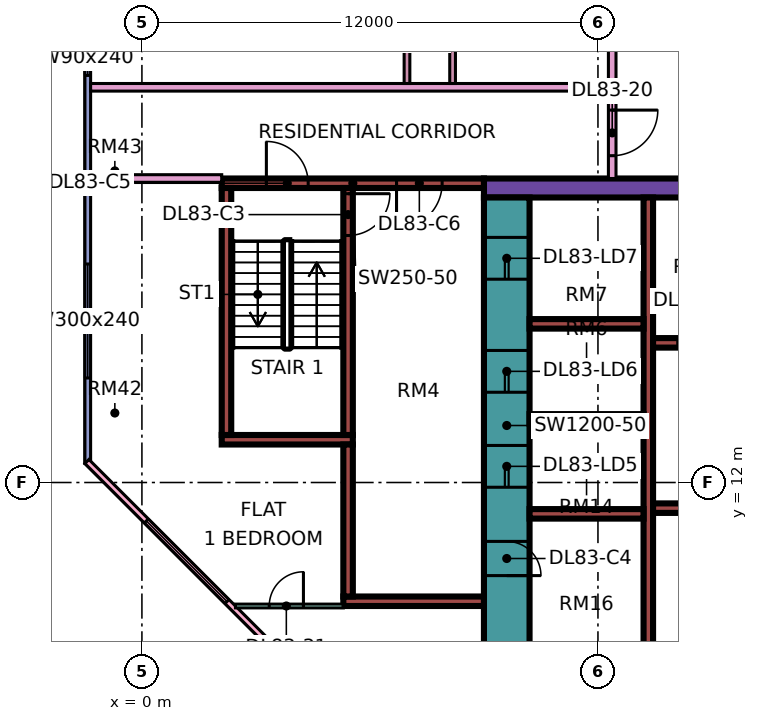
"""IFC4 building model, lengths in metres.
Left out: names, types, materials, properties, quantities, classifications, styles, units other than length and angle.
Written with IfcOpenShell. Run it as: python <this file> out.ifc"""

import sys

from ifc_helpers import new_model, si_unit, direction, frame, frame_2d, origin, place, context, subcontext, project, spatial, rectangle, extrude, element, fill, save


model = new_model("IFC4")
c1 = context("Model", 3, precision=1e-05, world=origin(), true_north=direction((0.0, 1.0)))
c2 = subcontext(c1, "Body", "Model", "MODEL_VIEW")
j1 = project(units=[si_unit("LENGTHUNIT", "METRE"), si_unit("PLANEANGLEUNIT", "RADIAN")], contexts=[c1])
p1 = place(None, origin())
s1 = spatial("IfcSite", under=j1, at=p1, CompositionType="ELEMENT")
p2 = place(p1, origin())
s2 = spatial("IfcBuilding", under=s1, at=p2, CompositionType="ELEMENT")
p3 = place(p2, frame((0.0, 0.0, 357.65)))
s3 = spatial("IfcBuildingStorey", under=s2, at=p3, CompositionType="ELEMENT", Elevation=357.65)
p4 = place(p3, frame((9.0, 19.75, 0.0), z_axis=(0.0, 0.0, 1.0), x_axis=(1.0, 0.0, 0.0)))
e1 = element("IfcWall", 1, at=p4, inside=s3, PredefinedType="SHEAR", context=c2, shape_type="SweptSolid", body=[
    extrude(rectangle(XDim=25.0, YDim=0.5, at=frame_2d((12.5, 0.0))), origin(), (0.0, 0.0, 1.0), 3.75),
])
p5 = place(p4, frame((19.1, 0.0, 0.0)))
e2 = element("IfcOpeningElement", 2, at=p5, cuts=e1, PredefinedType="OPENING", context=c2, shape_type="SweptSolid", body=[
    extrude(rectangle(XDim=1.8, YDim=2.4, at=frame_2d((0.9, 1.2))), frame((0.0, 0.26, 0.0), z_axis=(0.0, -1.0, 0.0), x_axis=(1.0, 0.0, 0.0)), (0.0, 0.0, 1.0), 0.52),
])
p6 = place(p3, frame((9.6, 7.5, 0.0), z_axis=(0.0, 0.0, 1.0), x_axis=(0.0, 1.0, 0.0)))
e3 = element("IfcWall", 3, at=p6, inside=s3, PredefinedType="SHEAR", context=c2, shape_type="SweptSolid", body=[
    extrude(rectangle(XDim=12.0, YDim=1.2, at=frame_2d((6.0, 0.0))), origin(), (0.0, 0.0, 1.0), 3.75),
])
p7 = place(p6, frame((4.375, 0.0, 0.0)))
e4 = element("IfcOpeningElement", 4, at=p7, cuts=e3, PredefinedType="OPENING", context=c2, shape_type="SweptSolid", body=[
    extrude(rectangle(XDim=1.1, YDim=2.2, at=frame_2d((0.55, 1.1))), frame((0.0, 0.61, 0.0), z_axis=(0.0, -1.0, 0.0), x_axis=(1.0, 0.0, 0.0)), (0.0, 0.0, 1.0), 1.22),
])
p8 = place(p6, frame((6.875, 0.0, 0.0)))
e5 = element("IfcOpeningElement", 5, at=p8, cuts=e3, PredefinedType="OPENING", context=c2, shape_type="SweptSolid", body=[
    extrude(rectangle(XDim=1.1, YDim=2.2, at=frame_2d((0.55, 1.1))), frame((0.0, 0.61, 0.0), z_axis=(0.0, -1.0, 0.0), x_axis=(1.0, 0.0, 0.0)), (0.0, 0.0, 1.0), 1.22),
])
p9 = place(p6, frame((9.85, 0.0, 0.0)))
e6 = element("IfcOpeningElement", 6, at=p9, cuts=e3, PredefinedType="OPENING", context=c2, shape_type="SweptSolid", body=[
    extrude(rectangle(XDim=1.1, YDim=2.2, at=frame_2d((0.55, 1.1))), frame((0.0, 0.61, 0.0), z_axis=(0.0, -1.0, 0.0), x_axis=(1.0, 0.0, 0.0)), (0.0, 0.0, 1.0), 1.22),
])
p10 = place(p6, frame((2.05, 0.0, 0.0)))
e7 = element("IfcOpeningElement", 7, at=p10, cuts=e3, PredefinedType="OPENING", context=c2, shape_type="SweptSolid", body=[
    extrude(rectangle(XDim=0.9, YDim=2.1, at=frame_2d((0.45, 1.05))), frame((0.0, 0.61, 0.0), z_axis=(0.0, -1.0, 0.0), x_axis=(1.0, 0.0, 0.0)), (0.0, 0.0, 1.0), 1.22),
])
p11 = place(p3, frame((13.325, 7.5, 0.0), z_axis=(0.0, 0.0, 1.0), x_axis=(0.0, 1.0, 0.0)))
e8 = element("IfcWall", 8, at=p11, inside=s3, PredefinedType="SHEAR", context=c2, shape_type="SweptSolid", body=[
    extrude(rectangle(XDim=12.0, YDim=0.25, at=frame_2d((6.0, 0.0))), origin(), (0.0, 0.0, 1.0), 3.75),
])
p12 = place(p3, frame((13.45, 11.325, 0.0), z_axis=(0.0, 0.0, 1.0), x_axis=(1.0, 0.0, 0.0)))
e9 = element("IfcWall", 9, at=p12, inside=s3, PredefinedType="SHEAR", context=c2, shape_type="SweptSolid", body=[
    extrude(rectangle(XDim=20.05, YDim=0.25, at=frame_2d((10.025, 0.0))), origin(), (0.0, 0.0, 1.0), 3.75),
])
p13 = place(p12, frame((2.8, 0.0, 0.0)))
e10 = element("IfcOpeningElement", 10, at=p13, cuts=e9, PredefinedType="OPENING", context=c2, shape_type="SweptSolid", body=[
    extrude(rectangle(XDim=0.9, YDim=2.1, at=frame_2d((0.45, 1.05))), frame((0.0, 0.135, 0.0), z_axis=(0.0, -1.0, 0.0), x_axis=(1.0, 0.0, 0.0)), (0.0, 0.0, 1.0), 0.27),
])
p14 = place(p12, frame((8.175, 0.0, 0.0)))
e11 = element("IfcOpeningElement", 11, at=p14, cuts=e9, PredefinedType="OPENING", context=c2, shape_type="SweptSolid", body=[
    extrude(rectangle(XDim=0.9, YDim=2.1, at=frame_2d((0.45, 1.05))), frame((0.0, 0.135, 0.0), z_axis=(0.0, -1.0, 0.0), x_axis=(1.0, 0.0, 0.0)), (0.0, 0.0, 1.0), 0.27),
])
p15 = place(p12, frame((13.175, 0.0, 0.0)))
e12 = element("IfcOpeningElement", 12, at=p15, cuts=e9, PredefinedType="OPENING", context=c2, shape_type="SweptSolid", body=[
    extrude(rectangle(XDim=0.9, YDim=2.1, at=frame_2d((0.45, 1.05))), frame((0.0, 0.135, 0.0), z_axis=(0.0, -1.0, 0.0), x_axis=(1.0, 0.0, 0.0)), (0.0, 0.0, 1.0), 0.27),
])
p16 = place(p12, frame((17.7, 0.0, 0.0)))
e13 = element("IfcOpeningElement", 13, at=p16, cuts=e9, PredefinedType="OPENING", context=c2, shape_type="SweptSolid", body=[
    extrude(rectangle(XDim=0.9, YDim=2.1, at=frame_2d((0.45, 1.05))), frame((0.0, 0.135, 0.0), z_axis=(0.0, -1.0, 0.0), x_axis=(1.0, 0.0, 0.0)), (0.0, 0.0, 1.0), 0.27),
])
p17 = place(p3, frame((13.45, 15.675, 0.0), z_axis=(0.0, 0.0, 1.0), x_axis=(1.0, 0.0, 0.0)))
e14 = element("IfcWall", 14, at=p17, inside=s3, PredefinedType="SHEAR", context=c2, shape_type="SweptSolid", body=[
    extrude(rectangle(XDim=13.75, YDim=0.25, at=frame_2d((6.875, 0.0))), origin(), (0.0, 0.0, 1.0), 3.75),
])
p18 = place(p17, frame((0.65, 0.0, 0.0)))
e15 = element("IfcOpeningElement", 15, at=p18, cuts=e14, PredefinedType="OPENING", context=c2, shape_type="SweptSolid", body=[
    extrude(rectangle(XDim=1.2, YDim=2.2, at=frame_2d((0.6, 1.1))), frame((0.0, 0.135, 0.0), z_axis=(0.0, -1.0, 0.0), x_axis=(1.0, 0.0, 0.0)), (0.0, 0.0, 1.0), 0.27),
])
p19 = place(p17, frame((3.4, 0.0, 0.0)))
e16 = element("IfcOpeningElement", 16, at=p19, cuts=e14, PredefinedType="OPENING", context=c2, shape_type="SweptSolid", body=[
    extrude(rectangle(XDim=1.2, YDim=2.2, at=frame_2d((0.6, 1.1))), frame((0.0, 0.135, 0.0), z_axis=(0.0, -1.0, 0.0), x_axis=(1.0, 0.0, 0.0)), (0.0, 0.0, 1.0), 0.27),
])
p20 = place(p17, frame((6.15, 0.0, 0.0)))
e17 = element("IfcOpeningElement", 17, at=p20, cuts=e14, PredefinedType="OPENING", context=c2, shape_type="SweptSolid", body=[
    extrude(rectangle(XDim=1.2, YDim=2.2, at=frame_2d((0.6, 1.1))), frame((0.0, 0.135, 0.0), z_axis=(0.0, -1.0, 0.0), x_axis=(1.0, 0.0, 0.0)), (0.0, 0.0, 1.0), 0.27),
])
p21 = place(p17, frame((8.9, 0.0, 0.0)))
e18 = element("IfcOpeningElement", 18, at=p21, cuts=e14, PredefinedType="OPENING", context=c2, shape_type="SweptSolid", body=[
    extrude(rectangle(XDim=1.2, YDim=2.2, at=frame_2d((0.6, 1.1))), frame((0.0, 0.135, 0.0), z_axis=(0.0, -1.0, 0.0), x_axis=(1.0, 0.0, 0.0)), (0.0, 0.0, 1.0), 0.27),
])
p22 = place(p17, frame((11.8, 0.0, 0.0)))
e19 = element("IfcOpeningElement", 19, at=p22, cuts=e14, PredefinedType="OPENING", context=c2, shape_type="SweptSolid", body=[
    extrude(rectangle(XDim=0.9, YDim=2.1, at=frame_2d((0.45, 1.05))), frame((0.0, 0.135, 0.0), z_axis=(0.0, -1.0, 0.0), x_axis=(1.0, 0.0, 0.0)), (0.0, 0.0, 1.0), 0.27),
])
for number, where, z_axis, x_axis in (
    (20, (10.2, 11.175, 0.0), (0.0, 0.0, 1.0), (1.0, 0.0, 0.0)),
    (21, (10.2, 13.675, 0.0), (0.0, 0.0, 1.0), (1.0, 0.0, 0.0)),
    (22, (10.2, 16.175, 0.0), (0.0, 0.0, 1.0), (1.0, 0.0, 0.0)),
):
    element("IfcWall", number, at=place(p3, frame(where, z_axis=z_axis, x_axis=x_axis)), inside=s3, PredefinedType="SHEAR", context=c2, shape_type="SweptSolid", body=[
        extrude(rectangle(XDim=3.0, YDim=0.25, at=frame_2d((1.5, 0.0))), origin(), (0.0, 0.0, 1.0), 3.75),
    ])
p23 = place(p3, frame((2.1, 19.875, 0.0), z_axis=(0.0, 0.0, 1.0), x_axis=(1.0, 0.0, 0.0)))
e23 = element("IfcWall", 23, at=p23, inside=s3, PredefinedType="SHEAR", context=c2, shape_type="SweptSolid", body=[
    extrude(rectangle(XDim=6.9, YDim=0.25, at=frame_2d((3.45, 0.0))), origin(), (0.0, 0.0, 1.0), 3.75),
])
p24 = place(p23, frame((1.175, 0.0, 0.0)))
e24 = element("IfcOpeningElement", 24, at=p24, cuts=e23, PredefinedType="OPENING", context=c2, shape_type="SweptSolid", body=[
    extrude(rectangle(XDim=1.1, YDim=2.2, at=frame_2d((0.55, 1.1))), frame((0.0, 0.135, 0.0), z_axis=(0.0, -1.0, 0.0), x_axis=(1.0, 0.0, 0.0)), (0.0, 0.0, 1.0), 0.27),
])
p25 = place(p23, frame((4.6, 0.0, 0.0)))
e25 = element("IfcOpeningElement", 25, at=p25, cuts=e23, PredefinedType="OPENING", context=c2, shape_type="SweptSolid", body=[
    extrude(rectangle(XDim=1.2, YDim=2.2, at=frame_2d((0.6, 1.1))), frame((0.0, 0.135, 0.0), z_axis=(0.0, -1.0, 0.0), x_axis=(1.0, 0.0, 0.0)), (0.0, 0.0, 1.0), 0.27),
])
p26 = place(p3, frame((2.1, 13.125, 0.0), z_axis=(0.0, 0.0, 1.0), x_axis=(1.0, 0.0, 0.0)))
e26 = element("IfcWall", 26, at=p26, inside=s3, PredefinedType="SHEAR", context=c2, shape_type="SweptSolid", body=[
    extrude(rectangle(XDim=3.45, YDim=0.25, at=frame_2d((1.725, 0.0))), origin(), (0.0, 0.0, 1.0), 3.75),
])
p27 = place(p3, frame((2.225, 13.25, 0.0), z_axis=(0.0, 0.0, 1.0), x_axis=(0.0, 1.0, 0.0)))
e27 = element("IfcWall", 27, at=p27, inside=s3, PredefinedType="SHEAR", context=c2, shape_type="SweptSolid", body=[
    extrude(rectangle(XDim=6.5, YDim=0.25, at=frame_2d((3.25, 0.0))), origin(), (0.0, 0.0, 1.0), 3.75),
])
p28 = place(p3, frame((5.425, 13.25, 0.0), z_axis=(0.0, 0.0, 1.0), x_axis=(0.0, 1.0, 0.0)))
e28 = element("IfcWall", 28, at=p28, inside=s3, PredefinedType="SHEAR", context=c2, shape_type="SweptSolid", body=[
    extrude(rectangle(XDim=6.5, YDim=0.25, at=frame_2d((3.25, 0.0))), origin(), (0.0, 0.0, 1.0), 3.75),
])
p29 = place(p28, frame((5.25, 0.0, 0.0)))
e29 = element("IfcOpeningElement", 29, at=p29, cuts=e28, PredefinedType="OPENING", context=c2, shape_type="SweptSolid", body=[
    extrude(rectangle(XDim=1.1, YDim=2.2, at=frame_2d((0.55, 1.1))), frame((0.0, 0.135, 0.0), z_axis=(0.0, -1.0, 0.0), x_axis=(1.0, 0.0, 0.0)), (0.0, 0.0, 1.0), 0.27),
])
p30 = place(p3, frame((5.3, 8.875, 0.0), z_axis=(0.0, 0.0, 1.0), x_axis=(1.0, 0.0, 0.0)))
e30 = element("IfcWall", 30, at=p30, inside=s3, PredefinedType="SHEAR", context=c2, shape_type="SweptSolid", body=[
    extrude(rectangle(XDim=3.7, YDim=0.25, at=frame_2d((1.85, 0.0))), origin(), (0.0, 0.0, 1.0), 3.75),
])
p31 = place(p3, frame((5.425, 9.0, 0.0), z_axis=(0.0, 0.0, 1.0), x_axis=(0.0, 1.0, 0.0)))
e31 = element("IfcWall", 31, at=p31, inside=s3, PredefinedType="SHEAR", context=c2, shape_type="SweptSolid", body=[
    extrude(rectangle(XDim=4.0, YDim=0.25, at=frame_2d((2.0, 0.0))), origin(), (0.0, 0.0, 1.0), 3.75),
])
p32 = place(p3, frame((-1.425, 23.925, 0.0), z_axis=(0.0, 0.0, 1.0), x_axis=(0.0, -1.0, 0.0)))
e32 = element("IfcWall", 32, at=p32, inside=s3, PredefinedType="SOLIDWALL", context=c2, shape_type="SweptSolid", body=[
    extrude(rectangle(XDim=11.425, YDim=0.15, at=frame_2d((5.712, 0.0))), origin(), (0.0, 0.0, 1.0), 3.35),
])
p33 = place(p32, frame((0.312, 0.0, 0.45)))
e33 = element("IfcOpeningElement", 33, at=p33, cuts=e32, PredefinedType="OPENING", context=c2, shape_type="SweptSolid", body=[
    extrude(rectangle(XDim=0.9, YDim=2.4, at=frame_2d((0.45, 1.2))), frame((0.0, 0.085, 0.0), z_axis=(0.0, -1.0, 0.0), x_axis=(1.0, 0.0, 0.0)), (0.0, 0.0, 1.0), 0.17),
])
p34 = place(p32, frame((6.175, 0.0, 0.45)))
e34 = element("IfcOpeningElement", 34, at=p34, cuts=e32, PredefinedType="OPENING", context=c2, shape_type="SweptSolid", body=[
    extrude(rectangle(XDim=3.0, YDim=2.4, at=frame_2d((1.5, 1.2))), frame((0.0, 0.085, 0.0), z_axis=(0.0, -1.0, 0.0), x_axis=(1.0, 0.0, 0.0)), (0.0, 0.0, 1.0), 0.17),
])
p35 = place(p3, frame((-1.447, 12.553, 0.0), z_axis=(0.0, 0.0, 1.0), x_axis=(0.707106781187, -0.707106781187, 0.0)))
e35 = element("IfcWall", 35, at=p35, inside=s3, PredefinedType="SOLIDWALL", context=c2, shape_type="SweptSolid", body=[
    extrude(rectangle(XDim=19.799, YDim=0.15, at=frame_2d((9.899, 0.0))), origin(), (0.0, 0.0, 1.0), 3.35),
])
p36 = place(p35, frame((2.212, 0.0, 0.45)))
e36 = element("IfcOpeningElement", 36, at=p36, cuts=e35, PredefinedType="OPENING", context=c2, shape_type="SweptSolid", body=[
    extrude(rectangle(XDim=3.0, YDim=2.4, at=frame_2d((1.5, 1.2))), frame((0.0, 0.085, 0.0), z_axis=(0.0, -1.0, 0.0), x_axis=(1.0, 0.0, 0.0)), (0.0, 0.0, 1.0), 0.17),
])
p37 = place(p35, frame((10.216, 0.0, 0.45)))
e37 = element("IfcOpeningElement", 37, at=p37, cuts=e35, PredefinedType="OPENING", context=c2, shape_type="SweptSolid", body=[
    extrude(rectangle(XDim=3.0, YDim=2.4, at=frame_2d((1.5, 1.2))), frame((0.0, 0.085, 0.0), z_axis=(0.0, -1.0, 0.0), x_axis=(1.0, 0.0, 0.0)), (0.0, 0.0, 1.0), 0.17),
])
p38 = place(p3, frame((-1.35, 20.0, 0.0), z_axis=(0.0, 0.0, 1.0), x_axis=(1.0, 0.0, 0.0)))
e38 = element("IfcWall", 38, at=p38, inside=s3, PredefinedType="PARTITIONING", context=c2, shape_type="SweptSolid", body=[
    extrude(rectangle(XDim=3.45, YDim=0.2, at=frame_2d((1.725, 0.0))), origin(), (0.0, 0.0, 1.0), 3.35),
])
p39 = place(p3, frame((-1.35, 22.4, 0.0), z_axis=(0.0, 0.0, 1.0), x_axis=(1.0, 0.0, 0.0)))
e39 = element("IfcWall", 39, at=p39, inside=s3, PredefinedType="PARTITIONING", context=c2, shape_type="SweptSolid", body=[
    extrude(rectangle(XDim=13.625, YDim=0.2, at=frame_2d((6.812, 0.0))), origin(), (0.0, 0.0, 1.0), 3.35),
])
p40 = place(p3, frame((2.461, 8.75, 0.0), z_axis=(0.0, 0.0, 1.0), x_axis=(1.0, 0.0, 0.0)))
e40 = element("IfcWall", 40, at=p40, inside=s3, PredefinedType="PARTITIONING", context=c2, shape_type="SweptSolid", body=[
    extrude(rectangle(XDim=2.839, YDim=0.1, at=frame_2d((1.419, 0.0))), origin(), (0.0, 0.0, 1.0), 3.35),
])
p41 = place(p40, frame((0.889, 0.0, 0.0)))
e41 = element("IfcOpeningElement", 41, at=p41, cuts=e40, PredefinedType="OPENING", context=c2, shape_type="SweptSolid", body=[
    extrude(rectangle(XDim=0.9, YDim=2.1, at=frame_2d((0.45, 1.05))), frame((0.0, 0.06, 0.0), z_axis=(0.0, -1.0, 0.0), x_axis=(1.0, 0.0, 0.0)), (0.0, 0.0, 1.0), 0.12),
])
p42 = place(p3, frame((6.975, 22.5, 0.0), z_axis=(0.0, 0.0, 1.0), x_axis=(0.0, 1.0, 0.0)))
e42 = element("IfcWall", 42, at=p42, inside=s3, PredefinedType="PARTITIONING", context=c2, shape_type="SweptSolid", body=[
    extrude(rectangle(XDim=10.55, YDim=0.15, at=frame_2d((5.275, 0.0))), origin(), (0.0, 0.0, 1.0), 3.35),
])
p43 = place(p42, frame((1.8, 0.0, 0.0)))
e43 = element("IfcOpeningElement", 43, at=p43, cuts=e42, PredefinedType="OPENING", context=c2, shape_type="SweptSolid", body=[
    extrude(rectangle(XDim=0.9, YDim=2.1, at=frame_2d((0.45, 1.05))), frame((0.0, 0.085, 0.0), z_axis=(0.0, -1.0, 0.0), x_axis=(1.0, 0.0, 0.0)), (0.0, 0.0, 1.0), 0.17),
])
p44 = place(p42, frame((8.55, 0.0, 0.0)))
e44 = element("IfcOpeningElement", 44, at=p44, cuts=e42, PredefinedType="OPENING", context=c2, shape_type="SweptSolid", body=[
    extrude(rectangle(XDim=0.9, YDim=2.1, at=frame_2d((0.45, 1.05))), frame((0.0, 0.085, 0.0), z_axis=(0.0, -1.0, 0.0), x_axis=(1.0, 0.0, 0.0)), (0.0, 0.0, 1.0), 0.17),
])
p45 = place(p3, frame((8.175, 22.5, 0.0), z_axis=(0.0, 0.0, 1.0), x_axis=(0.0, 1.0, 0.0)))
e45 = element("IfcWall", 45, at=p45, inside=s3, PredefinedType="PARTITIONING", context=c2, shape_type="SweptSolid", body=[
    extrude(rectangle(XDim=9.975, YDim=0.15, at=frame_2d((4.988, 0.0))), origin(), (0.0, 0.0, 1.0), 3.35),
])
p46 = place(p45, frame((8.25, 0.0, 0.0)))
e46 = element("IfcOpeningElement", 46, at=p46, cuts=e45, PredefinedType="OPENING", context=c2, shape_type="SweptSolid", body=[
    extrude(rectangle(XDim=0.8, YDim=2.1, at=frame_2d((0.4, 1.05))), frame((0.0, 0.085, 0.0), z_axis=(0.0, -1.0, 0.0), x_axis=(1.0, 0.0, 0.0)), (0.0, 0.0, 1.0), 0.17),
])
p47 = place(p45, frame((3.2, 0.0, 0.0)))
e47 = element("IfcOpeningElement", 47, at=p47, cuts=e45, PredefinedType="OPENING", context=c2, shape_type="SweptSolid", body=[
    extrude(rectangle(XDim=0.9, YDim=2.1, at=frame_2d((0.45, 1.05))), frame((0.0, 0.085, 0.0), z_axis=(0.0, -1.0, 0.0), x_axis=(1.0, 0.0, 0.0)), (0.0, 0.0, 1.0), 0.17),
])
p48 = place(p3, frame((12.375, 20.0, 0.0), z_axis=(0.0, 0.0, 1.0), x_axis=(0.0, 1.0, 0.0)))
e48 = element("IfcWall", 48, at=p48, inside=s3, PredefinedType="PARTITIONING", context=c2, shape_type="SweptSolid", body=[
    extrude(rectangle(XDim=34.0, YDim=0.2, at=frame_2d((17.0, 0.0))), origin(), (0.0, 0.0, 1.0), 3.35),
])
p49 = place(p48, frame((22.95, 0.0, 0.0)))
e49 = element("IfcOpeningElement", 49, at=p49, cuts=e48, PredefinedType="OPENING", context=c2, shape_type="SweptSolid", body=[
    extrude(rectangle(XDim=1.0, YDim=2.1, at=frame_2d((0.5, 1.05))), frame((0.0, 0.11, 0.0), z_axis=(0.0, -1.0, 0.0), x_axis=(1.0, 0.0, 0.0)), (0.0, 0.0, 1.0), 0.22),
])
p50 = place(p48, frame((0.6, 0.0, 0.0)))
e50 = element("IfcOpeningElement", 50, at=p50, cuts=e48, PredefinedType="OPENING", context=c2, shape_type="SweptSolid", body=[
    extrude(rectangle(XDim=1.2, YDim=2.1, at=frame_2d((0.6, 1.05))), frame((0.0, 0.11, 0.0), z_axis=(0.0, -1.0, 0.0), x_axis=(1.0, 0.0, 0.0)), (0.0, 0.0, 1.0), 0.22),
])
p51 = place(p48, frame((13.65, 0.0, 0.0)))
e51 = element("IfcOpeningElement", 51, at=p51, cuts=e48, PredefinedType="OPENING", context=c2, shape_type="SweptSolid", body=[
    extrude(rectangle(XDim=1.0, YDim=2.1, at=frame_2d((0.5, 1.05))), frame((0.0, 0.11, 0.0), z_axis=(0.0, -1.0, 0.0), x_axis=(1.0, 0.0, 0.0)), (0.0, 0.0, 1.0), 0.22),
])
p52 = place(p33, origin())
e52 = element("IfcWindow", 52, at=p52, inside=s3, PartitioningType="SINGLE_PANEL", PredefinedType="WINDOW", context=c2, shape_type="SweptSolid", body=[
    extrude(rectangle(XDim=0.9, YDim=2.4, at=frame_2d((0.45, 1.2))), frame((0.0, 0.03, 0.0), z_axis=(0.0, -1.0, 0.0), x_axis=(1.0, 0.0, 0.0)), (0.0, 0.0, 1.0), 0.06),
])
fill(e33, e52)
p53 = place(p34, origin())
e53 = element("IfcWindow", 53, at=p53, inside=s3, PartitioningType="SINGLE_PANEL", PredefinedType="WINDOW", context=c2, shape_type="SweptSolid", body=[
    extrude(rectangle(XDim=3.0, YDim=2.4, at=frame_2d((1.5, 1.2))), frame((0.0, 0.03, 0.0), z_axis=(0.0, -1.0, 0.0), x_axis=(1.0, 0.0, 0.0)), (0.0, 0.0, 1.0), 0.06),
])
fill(e34, e53)
p54 = place(p36, origin())
e54 = element("IfcWindow", 54, at=p54, inside=s3, PartitioningType="SINGLE_PANEL", PredefinedType="WINDOW", context=c2, shape_type="SweptSolid", body=[
    extrude(rectangle(XDim=3.0, YDim=2.4, at=frame_2d((1.5, 1.2))), frame((0.0, 0.03, 0.0), z_axis=(0.0, -1.0, 0.0), x_axis=(1.0, 0.0, 0.0)), (0.0, 0.0, 1.0), 0.06),
])
fill(e36, e54)
p55 = place(p18, origin())
e55 = element("IfcDoor", 55, at=p55, inside=s3, OperationType="DOUBLE_DOOR_SLIDING", PredefinedType="DOOR", context=c2, shape_type="SweptSolid", body=[
    extrude(rectangle(XDim=1.2, YDim=2.2, at=frame_2d((0.6, 1.1))), frame((0.0, 0.025, 0.0), z_axis=(0.0, -1.0, 0.0), x_axis=(1.0, 0.0, 0.0)), (0.0, 0.0, 1.0), 0.05),
])
fill(e15, e55)
p56 = place(p7, origin())
e56 = element("IfcDoor", 56, at=p56, inside=s3, OperationType="DOUBLE_DOOR_SLIDING", PredefinedType="DOOR", context=c2, shape_type="SweptSolid", body=[
    extrude(rectangle(XDim=1.1, YDim=2.2, at=frame_2d((0.55, 1.1))), frame((0.0, 0.025, 0.0), z_axis=(0.0, -1.0, 0.0), x_axis=(1.0, 0.0, 0.0)), (0.0, 0.0, 1.0), 0.05),
])
fill(e4, e56)
p57 = place(p8, origin())
e57 = element("IfcDoor", 57, at=p57, inside=s3, OperationType="DOUBLE_DOOR_SLIDING", PredefinedType="DOOR", context=c2, shape_type="SweptSolid", body=[
    extrude(rectangle(XDim=1.1, YDim=2.2, at=frame_2d((0.55, 1.1))), frame((0.0, 0.025, 0.0), z_axis=(0.0, -1.0, 0.0), x_axis=(1.0, 0.0, 0.0)), (0.0, 0.0, 1.0), 0.05),
])
fill(e5, e57)
p58 = place(p9, origin())
e58 = element("IfcDoor", 58, at=p58, inside=s3, OperationType="DOUBLE_DOOR_SLIDING", PredefinedType="DOOR", context=c2, shape_type="SweptSolid", body=[
    extrude(rectangle(XDim=1.1, YDim=2.2, at=frame_2d((0.55, 1.1))), frame((0.0, 0.025, 0.0), z_axis=(0.0, -1.0, 0.0), x_axis=(1.0, 0.0, 0.0)), (0.0, 0.0, 1.0), 0.05),
])
fill(e6, e58)
p59 = place(p29, origin())
e59 = element("IfcDoor", 59, at=p59, inside=s3, OperationType="SINGLE_SWING_RIGHT", PredefinedType="DOOR", context=c2, shape_type="SweptSolid", body=[
    extrude(rectangle(XDim=1.1, YDim=2.2, at=frame_2d((0.55, 1.1))), frame((0.0, 0.025, 0.0), z_axis=(0.0, -1.0, 0.0), x_axis=(1.0, 0.0, 0.0)), (0.0, 0.0, 1.0), 0.05),
])
fill(e29, e59)
p60 = place(p10, frame((0.9, 0.0, 0.0), z_axis=(0.0, 0.0, 1.0), x_axis=(-1.0, 0.0, 0.0)))
e60 = element("IfcDoor", 60, at=p60, inside=s3, OperationType="SINGLE_SWING_LEFT", PredefinedType="DOOR", context=c2, shape_type="SweptSolid", body=[
    extrude(rectangle(XDim=0.9, YDim=2.1, at=frame_2d((0.45, 1.05))), frame((0.0, 0.025, 0.0), z_axis=(0.0, -1.0, 0.0), x_axis=(1.0, 0.0, 0.0)), (0.0, 0.0, 1.0), 0.05),
])
fill(e7, e60)
p61 = place(p24, origin())
e61 = element("IfcDoor", 61, at=p61, inside=s3, OperationType="SINGLE_SWING_LEFT", PredefinedType="DOOR", context=c2, shape_type="SweptSolid", body=[
    extrude(rectangle(XDim=1.1, YDim=2.2, at=frame_2d((0.55, 1.1))), frame((0.0, 0.025, 0.0), z_axis=(0.0, -1.0, 0.0), x_axis=(1.0, 0.0, 0.0)), (0.0, 0.0, 1.0), 0.05),
])
fill(e24, e61)
p62 = place(p25, frame((1.2, 0.0, 0.0), z_axis=(0.0, 0.0, 1.0), x_axis=(-1.0, 0.0, 0.0)))
e62 = element("IfcDoor", 62, at=p62, inside=s3, OperationType="SINGLE_SWING_LEFT", PredefinedType="DOOR", context=c2, shape_type="SweptSolid", body=[
    extrude(rectangle(XDim=1.2, YDim=2.2, at=frame_2d((0.6, 1.1))), frame((0.0, 0.025, 0.0), z_axis=(0.0, -1.0, 0.0), x_axis=(1.0, 0.0, 0.0)), (0.0, 0.0, 1.0), 0.05),
])
fill(e25, e62)
p63 = place(p50, origin())
e63 = element("IfcDoor", 63, at=p63, inside=s3, OperationType="SINGLE_SWING_RIGHT", PredefinedType="DOOR", context=c2, shape_type="SweptSolid", body=[
    extrude(rectangle(XDim=1.2, YDim=2.1, at=frame_2d((0.6, 1.05))), frame((0.0, 0.025, 0.0), z_axis=(0.0, -1.0, 0.0), x_axis=(1.0, 0.0, 0.0)), (0.0, 0.0, 1.0), 0.05),
])
fill(e50, e63)
p64 = place(p41, frame((0.9, 0.0, 0.0), z_axis=(0.0, 0.0, 1.0), x_axis=(-1.0, 0.0, 0.0)))
e64 = element("IfcDoor", 64, at=p64, inside=s3, OperationType="SINGLE_SWING_RIGHT", PredefinedType="DOOR", context=c2, shape_type="SweptSolid", body=[
    extrude(rectangle(XDim=0.9, YDim=2.1, at=frame_2d((0.45, 1.05))), frame((0.0, 0.025, 0.0), z_axis=(0.0, -1.0, 0.0), x_axis=(1.0, 0.0, 0.0)), (0.0, 0.0, 1.0), 0.05),
])
fill(e41, e64)
save(model, sys.argv[1])
